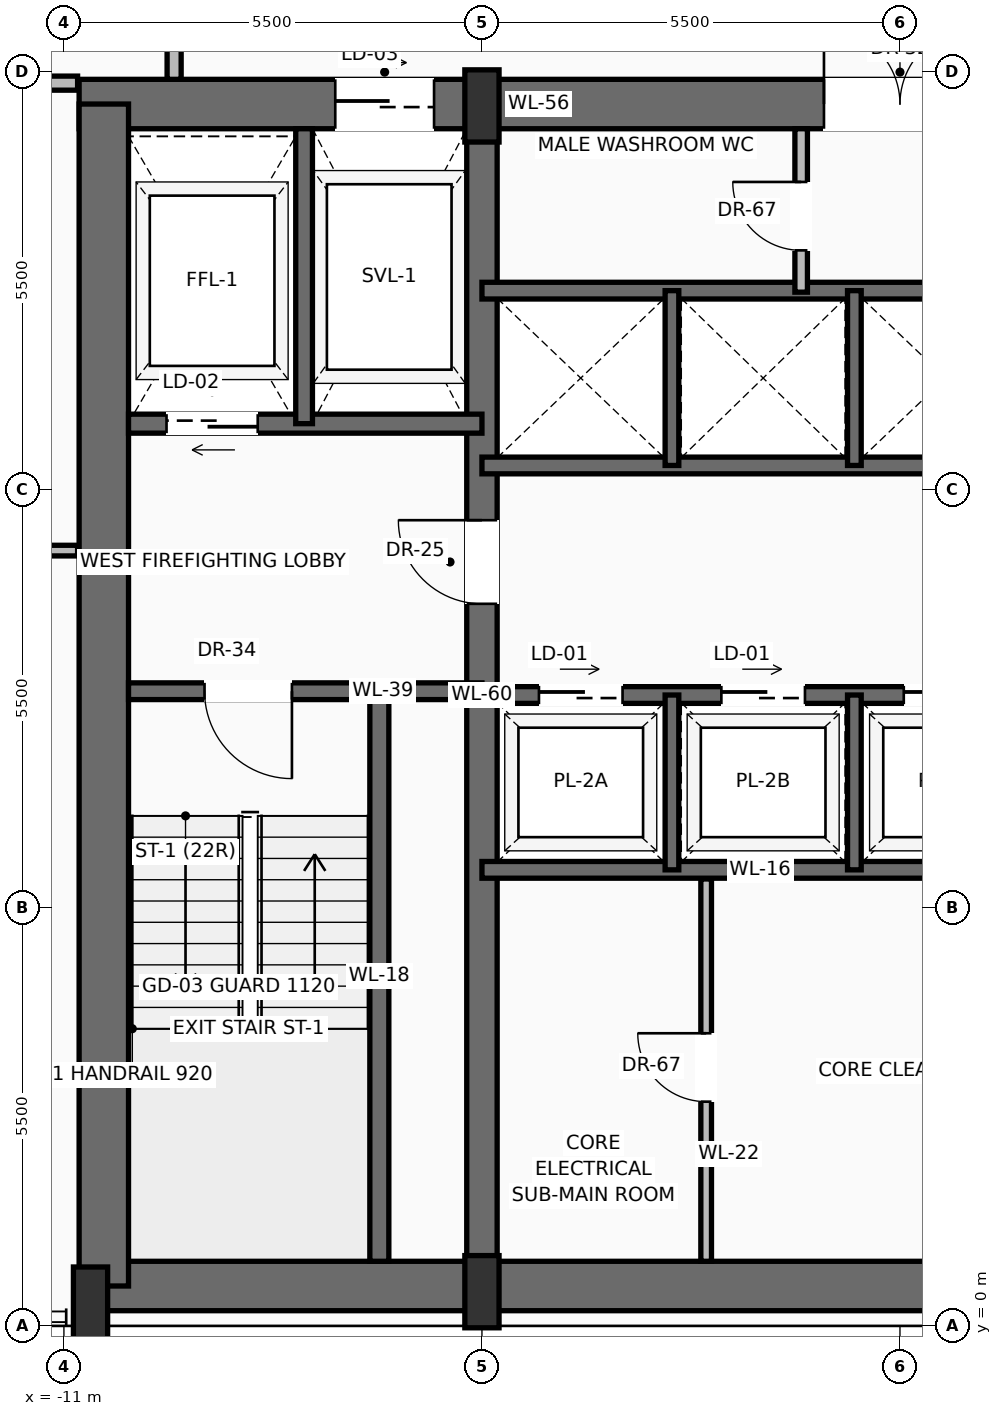
"""IFC4 building model, lengths in metres.
Left out: names, types, materials, properties, quantities, classifications, styles, units other than length and angle.
Written with IfcOpenShell. Run it as: python <this file> out.ifc"""

import sys

from ifc_helpers import new_model, si_unit, direction, frame, frame_2d, origin, origin_2d, place, context, subcontext, project, spatial, rectangle, extrude, source, transform, mapped, element, fill, save


model = new_model("IFC4")
c1 = context("Model", 3, precision=1e-05, world=origin(), true_north=direction((0.0, 1.0)))
c2 = subcontext(c1, "Body", "Model", "MODEL_VIEW")
j1 = project(units=[si_unit("LENGTHUNIT", "METRE"), si_unit("PLANEANGLEUNIT", "RADIAN")], contexts=[c1])
p1 = place(None, origin())
s1 = spatial("IfcSite", under=j1, at=p1, CompositionType="ELEMENT")
p2 = place(p1, origin())
s2 = spatial("IfcBuilding", under=s1, at=p2, CompositionType="ELEMENT")
p3 = place(p2, frame((0.0, 0.0, 204.3)))
s3 = spatial("IfcBuildingStorey", under=s2, at=p3, CompositionType="ELEMENT", Elevation=204.3)
p4 = place(p3, frame((-10.65, 0.525, 0.0), z_axis=(0.0, 0.0, 1.0), x_axis=(1.0, 0.0, 0.0)))
e1 = element("IfcWall", 1, at=p4, inside=s3, PredefinedType="SHEAR", context=c2, shape_type="SweptSolid", body=[
    extrude(rectangle(XDim=21.3, YDim=0.65, at=frame_2d((10.65, 0.0))), origin(), (0.0, 0.0, 1.0), 3.47),
])
p5 = place(p3, frame((-10.8, 16.075, 0.0), z_axis=(0.0, 0.0, 1.0), x_axis=(1.0, 0.0, 0.0)))
e2 = element("IfcWall", 2, at=p5, inside=s3, PredefinedType="SHEAR", context=c2, shape_type="SweptSolid", body=[
    extrude(rectangle(XDim=21.6, YDim=0.65, at=frame_2d((10.8, 0.0))), origin(), (0.0, 0.0, 1.0), 3.47),
])
p6 = place(p5, frame((3.37, 0.0, 0.0)))
e3 = element("IfcOpeningElement", 3, at=p6, cuts=e2, PredefinedType="OPENING", context=c2, shape_type="SweptSolid", body=[
    extrude(rectangle(XDim=1.3, YDim=2.3, at=frame_2d((0.65, 1.15))), frame((0.0, 0.335, 0.0), z_axis=(0.0, -1.0, 0.0), x_axis=(1.0, 0.0, 0.0)), (0.0, 0.0, 1.0), 0.67),
])
p7 = place(p5, frame((9.8, 0.0, 0.0)))
e4 = element("IfcOpeningElement", 4, at=p7, cuts=e2, PredefinedType="OPENING", context=c2, shape_type="SweptSolid", body=[
    extrude(rectangle(XDim=2.0, YDim=2.4, at=frame_2d((1.0, 1.2))), frame((0.0, 0.335, 0.0), z_axis=(0.0, -1.0, 0.0), x_axis=(1.0, 0.0, 0.0)), (0.0, 0.0, 1.0), 0.67),
])
p8 = place(p3, frame((-10.475, 0.525, 0.0), z_axis=(0.0, 0.0, 1.0), x_axis=(0.0, 1.0, 0.0)))
e5 = element("IfcWall", 5, at=p8, inside=s3, PredefinedType="SHEAR", context=c2, shape_type="SweptSolid", body=[
    extrude(rectangle(XDim=15.55, YDim=0.65, at=frame_2d((7.775, 0.0))), origin(), (0.0, 0.0, 1.0), 3.47),
])
p9 = place(p3, frame((-5.5, 0.525, 0.0), z_axis=(0.0, 0.0, 1.0), x_axis=(0.0, 1.0, 0.0)))
e6 = element("IfcWall", 6, at=p9, inside=s3, PredefinedType="SHEAR", context=c2, shape_type="SweptSolid", body=[
    extrude(rectangle(XDim=15.55, YDim=0.4, at=frame_2d((7.775, 0.0))), origin(), (0.0, 0.0, 1.0), 3.47),
])
p10 = place(p9, frame((8.975, 0.0, 0.0)))
e7 = element("IfcOpeningElement", 7, at=p10, cuts=e6, PredefinedType="OPENING", context=c2, shape_type="SweptSolid", body=[
    extrude(rectangle(XDim=1.1, YDim=2.2, at=frame_2d((0.55, 1.1))), frame((0.0, 0.21, 0.0), z_axis=(0.0, -1.0, 0.0), x_axis=(1.0, 0.0, 0.0)), (0.0, 0.0, 1.0), 0.42),
])
m1 = source(origin(), c2, "Body", "SweptSolid", [
    extrude(rectangle(XDim=0.45, YDim=0.95, at=origin_2d()), origin(), (0.0, 0.0, 1.0), 3.7),
])
for number, where, z_axis, x_axis in (
    (8, (-10.65, 0.3, 0.0), (0.0, 0.0, 1.0), (1.0, 0.0, 0.0)),
    (9, (-5.5, 0.45, 0.0), (0.0, 0.0, 1.0), (1.0, 0.0, 0.0)),
    (10, (-5.5, 16.05, 0.0), (0.0, 0.0, 1.0), (1.0, 0.0, 0.0)),
):
    element("IfcColumn", number, at=place(p3, frame(where, z_axis=z_axis, x_axis=x_axis)), inside=s3, PredefinedType="PILASTER", context=c2, shape_type="MappedRepresentation", body=[
        mapped(m1, transform((0.0, 0.0, 0.0), scale=1.0)),
    ])
p11 = place(p3, frame((-20.107, 15.909, 0.0), z_axis=(0.0, 0.0, 1.0), x_axis=(0.520259714572, 0.854008096796, 0.0)))
e11 = element("IfcWall", 11, at=p11, inside=s3, PredefinedType="SOLIDWALL", context=c2, shape_type="SweptSolid", body=[
    extrude(rectangle(XDim=19.115, YDim=0.28, at=frame_2d((9.558, 0.0))), origin(), (0.0, 0.0, 1.0), 3.05),
])
p12 = place(p11, frame((4.588, 0.0, 0.0)))
e12 = element("IfcOpeningElement", 12, at=p12, cuts=e11, PredefinedType="OPENING", context=c2, shape_type="SweptSolid", body=[
    extrude(rectangle(XDim=1.6, YDim=2.35, at=frame_2d((0.8, 1.175))), frame((0.0, 0.15, 0.0), z_axis=(0.0, -1.0, 0.0), x_axis=(1.0, 0.0, 0.0)), (0.0, 0.0, 1.0), 0.3),
])
p13 = place(p11, frame((12.998, 0.0, 0.9)))
e13 = element("IfcOpeningElement", 13, at=p13, cuts=e11, PredefinedType="OPENING", context=c2, shape_type="SweptSolid", body=[
    extrude(rectangle(XDim=2.0, YDim=1.85, at=frame_2d((1.0, 0.925))), frame((0.0, 0.15, 0.0), z_axis=(0.0, -1.0, 0.0), x_axis=(1.0, 0.0, 0.0)), (0.0, 0.0, 1.0), 0.3),
])
p14 = place(p3, frame((-6.85, 0.85, 0.0), z_axis=(0.0, 0.0, 1.0), x_axis=(0.0, 1.0, 0.0)))
e14 = element("IfcWall", 14, at=p14, inside=s3, PredefinedType="SOLIDWALL", context=c2, shape_type="SweptSolid", body=[
    extrude(rectangle(XDim=7.5, YDim=0.25, at=frame_2d((3.75, 0.0))), origin(), (0.0, 0.0, 1.0), 3.47),
])
p15 = place(p3, frame((-5.5, 8.35, 0.0), z_axis=(0.0, 0.0, 1.0), x_axis=(-1.0, 0.0, 0.0)))
e15 = element("IfcWall", 15, at=p15, inside=s3, PredefinedType="SOLIDWALL", context=c2, shape_type="SweptSolid", body=[
    extrude(rectangle(XDim=4.65, YDim=0.22, at=frame_2d((2.325, 0.0))), origin(), (0.0, 0.0, 1.0), 3.47),
])
p16 = place(p15, frame((2.5, 0.0, 0.0)))
e16 = element("IfcOpeningElement", 16, at=p16, cuts=e15, PredefinedType="OPENING", context=c2, shape_type="SweptSolid", body=[
    extrude(rectangle(XDim=1.15, YDim=2.2, at=frame_2d((0.575, 1.1))), frame((0.0, 0.12, 0.0), z_axis=(0.0, -1.0, 0.0), x_axis=(1.0, 0.0, 0.0)), (0.0, 0.0, 1.0), 0.24),
])
p17 = place(p3, frame((-5.5, 11.87, 0.0), z_axis=(0.0, 0.0, 1.0), x_axis=(-1.0, 0.0, 0.0)))
e17 = element("IfcWall", 17, at=p17, inside=s3, PredefinedType="SOLIDWALL", context=c2, shape_type="SweptSolid", body=[
    extrude(rectangle(XDim=4.65, YDim=0.25, at=frame_2d((2.325, 0.0))), origin(), (0.0, 0.0, 1.0), 3.47),
])
p18 = place(p17, frame((2.95, 0.0, 0.0)))
e18 = element("IfcOpeningElement", 18, at=p18, cuts=e17, PredefinedType="OPENING", context=c2, shape_type="SweptSolid", body=[
    extrude(rectangle(XDim=1.2, YDim=2.25, at=frame_2d((0.6, 1.125))), frame((0.0, 0.135, 0.0), z_axis=(0.0, -1.0, 0.0), x_axis=(1.0, 0.0, 0.0)), (0.0, 0.0, 1.0), 0.27),
])
p19 = place(p3, frame((-7.84, 11.87, 0.0), z_axis=(0.0, 0.0, 1.0), x_axis=(0.0, 1.0, 0.0)))
e19 = element("IfcWall", 19, at=p19, inside=s3, PredefinedType="SOLIDWALL", context=c2, shape_type="SweptSolid", body=[
    extrude(rectangle(XDim=3.88, YDim=0.22, at=frame_2d((1.94, 0.0))), origin(), (0.0, 0.0, 1.0), 3.47),
])
p20 = place(p3, frame((-2.55, 0.85, 0.0), z_axis=(0.0, 0.0, 1.0), x_axis=(0.0, 1.0, 0.0)))
e20 = element("IfcWall", 20, at=p20, inside=s3, PredefinedType="PARTITIONING", context=c2, shape_type="SweptSolid", body=[
    extrude(rectangle(XDim=5.03, YDim=0.14, at=frame_2d((2.515, 0.0))), origin(), (0.0, 0.0, 1.0), 3.462),
])
p21 = place(p20, frame((2.1, 0.0, 0.0)))
e21 = element("IfcOpeningElement", 21, at=p21, cuts=e20, PredefinedType="OPENING", context=c2, shape_type="SweptSolid", body=[
    extrude(rectangle(XDim=0.9, YDim=2.1, at=frame_2d((0.45, 1.05))), frame((0.0, 0.08, 0.0), z_axis=(0.0, -1.0, 0.0), x_axis=(1.0, 0.0, 0.0)), (0.0, 0.0, 1.0), 0.16),
])
p22 = place(p3, frame((-5.5, 6.0, 0.0), z_axis=(0.0, 0.0, 1.0), x_axis=(1.0, 0.0, 0.0)))
e22 = element("IfcWall", 22, at=p22, inside=s3, PredefinedType="SOLIDWALL", context=c2, shape_type="SweptSolid", body=[
    extrude(rectangle(XDim=7.32, YDim=0.22, at=frame_2d((3.66, 0.0))), origin(), (0.0, 0.0, 1.0), 3.47),
])
p23 = place(p3, frame((-5.5, 8.3, 0.0), z_axis=(0.0, 0.0, 1.0), x_axis=(1.0, 0.0, 0.0)))
e23 = element("IfcWall", 23, at=p23, inside=s3, PredefinedType="SOLIDWALL", context=c2, shape_type="SweptSolid", body=[
    extrude(rectangle(XDim=7.32, YDim=0.22, at=frame_2d((3.66, 0.0))), origin(), (0.0, 0.0, 1.0), 3.47),
])
p24 = place(p23, frame((0.75, 0.0, 0.0)))
e24 = element("IfcOpeningElement", 24, at=p24, cuts=e23, PredefinedType="OPENING", context=c2, shape_type="SweptSolid", body=[
    extrude(rectangle(XDim=1.1, YDim=2.2, at=frame_2d((0.55, 1.1))), frame((0.0, 0.12, 0.0), z_axis=(0.0, -1.0, 0.0), x_axis=(1.0, 0.0, 0.0)), (0.0, 0.0, 1.0), 0.24),
])
p25 = place(p23, frame((3.15, 0.0, 0.0)))
e25 = element("IfcOpeningElement", 25, at=p25, cuts=e23, PredefinedType="OPENING", context=c2, shape_type="SweptSolid", body=[
    extrude(rectangle(XDim=1.1, YDim=2.2, at=frame_2d((0.55, 1.1))), frame((0.0, 0.12, 0.0), z_axis=(0.0, -1.0, 0.0), x_axis=(1.0, 0.0, 0.0)), (0.0, 0.0, 1.0), 0.24),
])
p26 = place(p23, frame((5.55, 0.0, 0.0)))
e26 = element("IfcOpeningElement", 26, at=p26, cuts=e23, PredefinedType="OPENING", context=c2, shape_type="SweptSolid", body=[
    extrude(rectangle(XDim=1.1, YDim=2.2, at=frame_2d((0.55, 1.1))), frame((0.0, 0.12, 0.0), z_axis=(0.0, -1.0, 0.0), x_axis=(1.0, 0.0, 0.0)), (0.0, 0.0, 1.0), 0.24),
])
for number, where, z_axis, x_axis in (
    (27, (-3.0, 6.0, 0.0), (0.0, 0.0, 1.0), (0.0, 1.0, 0.0)),
    (28, (-0.6, 6.0, 0.0), (0.0, 0.0, 1.0), (0.0, 1.0, 0.0)),
):
    element("IfcWall", number, at=place(p3, frame(where, z_axis=z_axis, x_axis=x_axis)), inside=s3, PredefinedType="SOLIDWALL", context=c2, shape_type="SweptSolid", body=[
        extrude(rectangle(XDim=2.3, YDim=0.18, at=frame_2d((1.15, 0.0))), origin(), (0.0, 0.0, 1.0), 3.47),
    ])
for number, where, z_axis, x_axis in (
    (29, (-5.5, 11.32, 0.0), (0.0, 0.0, 1.0), (1.0, 0.0, 0.0)),
    (30, (-5.5, 13.62, 0.0), (0.0, 0.0, 1.0), (1.0, 0.0, 0.0)),
):
    element("IfcWall", number, at=place(p3, frame(where, z_axis=z_axis, x_axis=x_axis)), inside=s3, PredefinedType="SOLIDWALL", context=c2, shape_type="SweptSolid", body=[
        extrude(rectangle(XDim=7.32, YDim=0.22, at=frame_2d((3.66, 0.0))), origin(), (0.0, 0.0, 1.0), 3.47),
    ])
for number, where, z_axis, x_axis in (
    (31, (-3.0, 11.32, 0.0), (0.0, 0.0, 1.0), (0.0, 1.0, 0.0)),
    (32, (-0.6, 11.32, 0.0), (0.0, 0.0, 1.0), (0.0, 1.0, 0.0)),
):
    element("IfcWall", number, at=place(p3, frame(where, z_axis=z_axis, x_axis=x_axis)), inside=s3, PredefinedType="SOLIDWALL", context=c2, shape_type="SweptSolid", body=[
        extrude(rectangle(XDim=2.3, YDim=0.18, at=frame_2d((1.15, 0.0))), origin(), (0.0, 0.0, 1.0), 3.47),
    ])
p27 = place(p3, frame((-1.3, 13.6, 0.0), z_axis=(0.0, 0.0, 1.0), x_axis=(0.0, 1.0, 0.0)))
e33 = element("IfcWall", 33, at=p27, inside=s3, PredefinedType="PARTITIONING", context=c2, shape_type="SweptSolid", body=[
    extrude(rectangle(XDim=2.15, YDim=0.165, at=frame_2d((1.075, 0.0))), origin(), (0.0, 0.0, 1.0), 3.462),
])
p28 = place(p27, frame((0.55, 0.0, 0.0)))
e34 = element("IfcOpeningElement", 34, at=p28, cuts=e33, PredefinedType="OPENING", context=c2, shape_type="SweptSolid", body=[
    extrude(rectangle(XDim=0.9, YDim=2.1, at=frame_2d((0.45, 1.05))), frame((0.0, 0.093, 0.0), z_axis=(0.0, -1.0, 0.0), x_axis=(1.0, 0.0, 0.0)), (0.0, 0.0, 1.0), 0.185),
])
p29 = place(p3, frame((-9.55, 16.4, 0.0), z_axis=(0.0, 0.0, 1.0), x_axis=(0.0, 1.0, 0.0)))
e35 = element("IfcWall", 35, at=p29, inside=s3, PredefinedType="PARTITIONING", context=c2, shape_type="SweptSolid", body=[
    extrude(rectangle(XDim=5.8, YDim=0.185, at=frame_2d((2.9, 0.0))), origin(), (0.0, 0.0, 1.0), 3.462),
])
p30 = place(p29, frame((2.169, 0.0, 0.0)))
e36 = element("IfcOpeningElement", 36, at=p30, cuts=e35, PredefinedType="OPENING", context=c2, shape_type="SweptSolid", body=[
    extrude(rectangle(XDim=0.95, YDim=2.2, at=frame_2d((0.475, 1.1))), frame((0.0, 0.103, 0.0), z_axis=(0.0, -1.0, 0.0), x_axis=(1.0, 0.0, 0.0)), (0.0, 0.0, 1.0), 0.205),
])
p31 = place(p3, frame((-19.99, 16.35, 0.0), z_axis=(0.0, 0.0, 1.0), x_axis=(1.0, 0.0, 0.0)))
e37 = element("IfcWall", 37, at=p31, inside=s3, PredefinedType="PARTITIONING", context=c2, shape_type="SweptSolid", body=[
    extrude(rectangle(XDim=9.17, YDim=0.185, at=frame_2d((4.585, 0.0))), origin(), (0.0, 0.0, 1.0), 3.462),
])
p32 = place(p31, frame((5.384, 0.0, 0.0)))
e38 = element("IfcOpeningElement", 38, at=p32, cuts=e37, PredefinedType="OPENING", context=c2, shape_type="SweptSolid", body=[
    extrude(rectangle(XDim=0.95, YDim=2.2, at=frame_2d((0.475, 1.1))), frame((0.0, 0.103, 0.0), z_axis=(0.0, -1.0, 0.0), x_axis=(1.0, 0.0, 0.0)), (0.0, 0.0, 1.0), 0.205),
])
p33 = place(p3, frame((-23.737, 10.2, 0.0), z_axis=(0.0, 0.0, 1.0), x_axis=(1.0, 0.0, 0.0)))
e39 = element("IfcWall", 39, at=p33, inside=s3, PredefinedType="PARTITIONING", context=c2, shape_type="SweptSolid", body=[
    extrude(rectangle(XDim=12.917, YDim=0.14, at=frame_2d((6.458, 0.0))), origin(), (0.0, 0.0, 1.0), 3.462),
])
p34 = place(p33, frame((5.989, 0.0, 0.0)))
e40 = element("IfcOpeningElement", 40, at=p34, cuts=e39, PredefinedType="OPENING", context=c2, shape_type="SweptSolid", body=[
    extrude(rectangle(XDim=0.95, YDim=2.2, at=frame_2d((0.475, 1.1))), frame((0.0, 0.08, 0.0), z_axis=(0.0, -1.0, 0.0), x_axis=(1.0, 0.0, 0.0)), (0.0, 0.0, 1.0), 0.16),
])
m2 = source(origin(), c2, "Body", "SweptSolid", [
    extrude(rectangle(XDim=1.15, YDim=2.2, at=frame_2d((0.575, 1.1))), frame((0.0, 0.025, 0.0), z_axis=(0.0, -1.0, 0.0), x_axis=(1.0, 0.0, 0.0)), (0.0, 0.0, 1.0), 0.05),
])
p35 = place(p16, origin())
e41 = element("IfcDoor", 41, at=p35, inside=s3, OperationType="SINGLE_SWING_LEFT", PredefinedType="DOOR", context=c2, shape_type="MappedRepresentation", body=[
    mapped(m2, transform((0.0, 0.0, 0.0), scale=1.0)),
])
fill(e16, e41)
m3 = source(origin(), c2, "Body", "SweptSolid", [
    extrude(rectangle(XDim=1.1, YDim=2.2, at=frame_2d((0.55, 1.1))), frame((0.0, 0.025, 0.0), z_axis=(0.0, -1.0, 0.0), x_axis=(1.0, 0.0, 0.0)), (0.0, 0.0, 1.0), 0.05),
])
p36 = place(p10, origin())
e42 = element("IfcDoor", 42, at=p36, inside=s3, OperationType="SINGLE_SWING_RIGHT", PredefinedType="DOOR", context=c2, shape_type="MappedRepresentation", body=[
    mapped(m3, transform((0.0, 0.0, 0.0), scale=1.0)),
])
fill(e7, e42)
m4 = source(origin(), c2, "Body", "SweptSolid", [
    extrude(rectangle(XDim=1.2, YDim=2.25, at=frame_2d((0.6, 1.125))), frame((0.0, 0.025, 0.0), z_axis=(0.0, -1.0, 0.0), x_axis=(1.0, 0.0, 0.0)), (0.0, 0.0, 1.0), 0.05),
])
p37 = place(p18, origin())
e43 = element("IfcDoor", 43, at=p37, inside=s3, OperationType="SLIDING_TO_LEFT", PredefinedType="DOOR", context=c2, shape_type="MappedRepresentation", body=[
    mapped(m4, transform((0.0, 0.0, 0.0), scale=1.0)),
])
fill(e18, e43)
m5 = source(origin(), c2, "Body", "SweptSolid", [
    extrude(rectangle(XDim=1.3, YDim=2.3, at=frame_2d((0.65, 1.15))), frame((0.0, 0.025, 0.0), z_axis=(0.0, -1.0, 0.0), x_axis=(1.0, 0.0, 0.0)), (0.0, 0.0, 1.0), 0.05),
])
p38 = place(p6, origin())
e44 = element("IfcDoor", 44, at=p38, inside=s3, OperationType="SLIDING_TO_RIGHT", PredefinedType="DOOR", context=c2, shape_type="MappedRepresentation", body=[
    mapped(m5, transform((0.0, 0.0, 0.0), scale=1.0)),
])
fill(e3, e44)
m6 = source(origin(), c2, "Body", "SweptSolid", [
    extrude(rectangle(XDim=2.0, YDim=2.4, at=frame_2d((1.0, 1.2))), frame((0.0, 0.025, 0.0), z_axis=(0.0, -1.0, 0.0), x_axis=(1.0, 0.0, 0.0)), (0.0, 0.0, 1.0), 0.05),
])
p39 = place(p7, origin())
e45 = element("IfcDoor", 45, at=p39, inside=s3, OperationType="DOUBLE_DOOR_SINGLE_SWING", PredefinedType="DOOR", context=c2, shape_type="MappedRepresentation", body=[
    mapped(m6, transform((0.0, 0.0, 0.0), scale=1.0)),
])
fill(e4, e45)
m7 = source(origin(), c2, "Body", "SweptSolid", [
    extrude(rectangle(XDim=0.9, YDim=2.1, at=frame_2d((0.45, 1.05))), frame((0.0, 0.025, 0.0), z_axis=(0.0, -1.0, 0.0), x_axis=(1.0, 0.0, 0.0)), (0.0, 0.0, 1.0), 0.05),
])
p40 = place(p21, origin())
e46 = element("IfcDoor", 46, at=p40, inside=s3, OperationType="SINGLE_SWING_RIGHT", PredefinedType="DOOR", context=c2, shape_type="MappedRepresentation", body=[
    mapped(m7, transform((0.0, 0.0, 0.0), scale=1.0)),
])
fill(e21, e46)
m8 = source(origin(), c2, "Body", "SweptSolid", [
    extrude(rectangle(XDim=1.1, YDim=2.2, at=frame_2d((0.55, 1.1))), frame((0.0, 0.025, 0.0), z_axis=(0.0, -1.0, 0.0), x_axis=(1.0, 0.0, 0.0)), (0.0, 0.0, 1.0), 0.05),
])
p41 = place(p24, origin())
e47 = element("IfcDoor", 47, at=p41, inside=s3, OperationType="SLIDING_TO_LEFT", PredefinedType="DOOR", context=c2, shape_type="MappedRepresentation", body=[
    mapped(m8, transform((0.0, 0.0, 0.0), scale=1.0)),
])
fill(e24, e47)
p42 = place(p25, origin())
e48 = element("IfcDoor", 48, at=p42, inside=s3, OperationType="SLIDING_TO_LEFT", PredefinedType="DOOR", context=c2, shape_type="MappedRepresentation", body=[
    mapped(m8, transform((0.0, 0.0, 0.0), scale=1.0)),
])
fill(e25, e48)
p43 = place(p26, origin())
e49 = element("IfcDoor", 49, at=p43, inside=s3, OperationType="SLIDING_TO_LEFT", PredefinedType="DOOR", context=c2, shape_type="MappedRepresentation", body=[
    mapped(m8, transform((0.0, 0.0, 0.0), scale=1.0)),
])
fill(e26, e49)
p44 = place(p28, origin())
e50 = element("IfcDoor", 50, at=p44, inside=s3, OperationType="SINGLE_SWING_RIGHT", PredefinedType="DOOR", context=c2, shape_type="MappedRepresentation", body=[
    mapped(m7, transform((0.0, 0.0, 0.0), scale=1.0)),
])
fill(e34, e50)
save(model, sys.argv[1])
